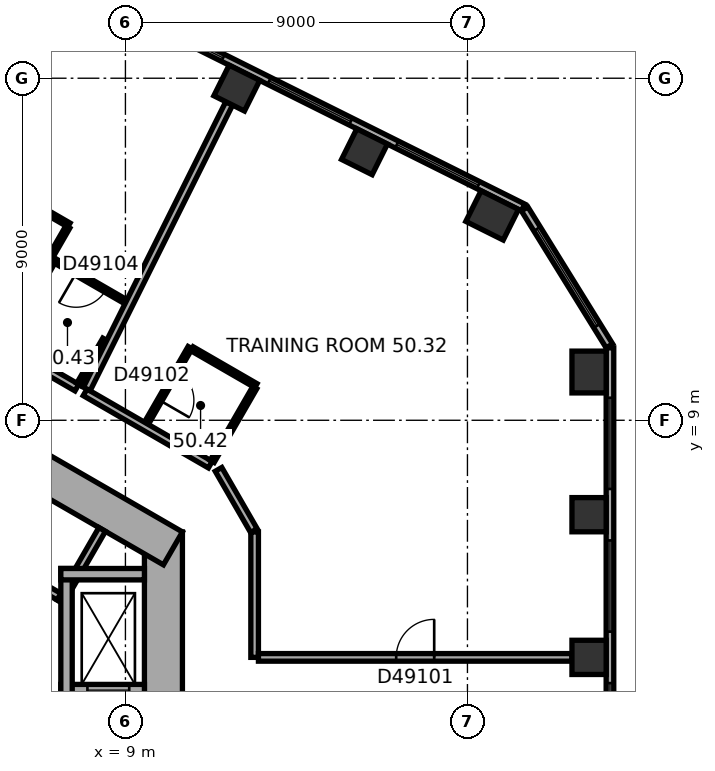
"""IFC4 building model, lengths in metres.
Left out: names, types, materials, properties, quantities, classifications, styles, units other than length and angle.
Written with IfcOpenShell. Run it as: python <this file> out.ifc"""

import sys

from ifc_helpers import new_model, si_unit, direction, frame, frame_2d, origin, origin_2d, place, context, subcontext, project, spatial, rectangle, extrude, element, fill, save


model = new_model("IFC4")
c1 = context("Model", 3, precision=1e-05, world=origin(), true_north=direction((0.0, 1.0)))
c2 = subcontext(c1, "Body", "Model", "MODEL_VIEW")
j1 = project(units=[si_unit("LENGTHUNIT", "METRE"), si_unit("PLANEANGLEUNIT", "RADIAN")], contexts=[c1])
p1 = place(None, origin())
s1 = spatial("IfcSite", under=j1, at=p1, CompositionType="ELEMENT")
p2 = place(p1, origin())
s2 = spatial("IfcBuilding", under=s1, at=p2, CompositionType="ELEMENT")
p3 = place(p2, frame((0.0, 0.0, 202.1)))
s3 = spatial("IfcBuildingStorey", under=s2, at=p3, CompositionType="ELEMENT", Elevation=202.1)
for number, where, z_axis, x_axis in (
    (1, (21.2, 2.761, 0.0), (0.0, 0.0, 1.0), (0.0, 1.0, 0.0)),
    (2, (21.2, 6.515, 0.0), (0.0, 0.0, 1.0), (0.0, 1.0, 0.0)),
):
    element("IfcColumn", number, at=place(p3, frame(where, z_axis=z_axis, x_axis=x_axis)), inside=s3, PredefinedType="COLUMN", context=c2, shape_type="SweptSolid", body=[
        extrude(rectangle(XDim=0.9, YDim=0.9, at=origin_2d()), origin(), (0.0, 0.0, 1.0), 3.7),
    ])
for number, where, z_axis, x_axis in (
    (3, (21.2, 10.27, 0.0), (0.0, 0.0, 1.0), (0.0, 1.0, 0.0)),
    (4, (18.65, 14.39, 0.0), (0.0, 0.0, 1.0), (-0.895, 0.446, 0.0)),
):
    element("IfcColumn", number, at=place(p3, frame(where, z_axis=z_axis, x_axis=x_axis)), inside=s3, PredefinedType="COLUMN", context=c2, shape_type="SweptSolid", body=[
        extrude(rectangle(XDim=1.1, YDim=0.9, at=origin_2d()), origin(), (0.0, 0.0, 1.0), 3.7),
    ])
for number, where, z_axis, x_axis in (
    (5, (15.29, 16.065, 0.0), (0.0, 0.0, 1.0), (-0.895, 0.446, 0.0)),
    (6, (11.931, 17.74, 0.0), (0.0, 0.0, 1.0), (-0.895, 0.446, 0.0)),
):
    element("IfcColumn", number, at=place(p3, frame(where, z_axis=z_axis, x_axis=x_axis)), inside=s3, PredefinedType="COLUMN", context=c2, shape_type="SweptSolid", body=[
        extrude(rectangle(XDim=0.9, YDim=0.9, at=origin_2d()), origin(), (0.0, 0.0, 1.0), 3.7),
    ])
p4 = place(p3, frame((10.0, -6.062, 0.0), z_axis=(0.0, 0.0, 1.0), x_axis=(0.0, 1.0, 0.0)))
e7 = element("IfcWall", 7, at=p4, inside=s3, PredefinedType="SHEAR", context=c2, shape_type="SweptSolid", body=[
    extrude(rectangle(XDim=12.125, YDim=1.0, at=frame_2d((6.062, 0.0))), origin(), (0.0, 0.0, 1.0), 3.7),
])
p5 = place(p4, frame((6.262, 0.0, 0.0)))
e8 = element("IfcOpeningElement", 8, at=p5, cuts=e7, PredefinedType="OPENING", context=c2, shape_type="SweptSolid", body=[
    extrude(rectangle(XDim=1.5, YDim=2.1, at=frame_2d((0.75, 1.05))), frame((0.0, 0.51, 0.0), z_axis=(0.0, -1.0, 0.0), x_axis=(1.0, 0.0, 0.0)), (0.0, 0.0, 1.0), 1.02),
])
p6 = place(p4, frame((1.812, 0.0, 0.0)))
e9 = element("IfcOpeningElement", 9, at=p6, cuts=e7, PredefinedType="OPENING", context=c2, shape_type="SweptSolid", body=[
    extrude(rectangle(XDim=0.9, YDim=2.1, at=frame_2d((0.45, 1.05))), frame((0.0, 0.51, 0.0), z_axis=(0.0, -1.0, 0.0), x_axis=(1.0, 0.0, 0.0)), (0.0, 0.0, 1.0), 1.02),
])
p7 = place(p4, frame((4.412, 0.0, 0.0)))
e10 = element("IfcOpeningElement", 10, at=p7, cuts=e7, PredefinedType="OPENING", context=c2, shape_type="SweptSolid", body=[
    extrude(rectangle(XDim=0.9, YDim=2.1, at=frame_2d((0.45, 1.05))), frame((0.0, 0.51, 0.0), z_axis=(0.0, -1.0, 0.0), x_axis=(1.0, 0.0, 0.0)), (0.0, 0.0, 1.0), 1.02),
])
p8 = place(p3, frame((10.25, 5.629, 0.0), z_axis=(0.0, 0.0, 1.0), x_axis=(-0.866022616891, 0.50000482701, 0.0)))
e11 = element("IfcWall", 11, at=p8, inside=s3, PredefinedType="SHEAR", context=c2, shape_type="SweptSolid", body=[
    extrude(rectangle(XDim=12.125, YDim=1.0, at=frame_2d((6.062, 0.0))), origin(), (0.0, 0.0, 1.0), 3.7),
])
p9 = place(p8, frame((5.312, 0.0, 0.0)))
e12 = element("IfcOpeningElement", 12, at=p9, cuts=e11, PredefinedType="OPENING", context=c2, shape_type="SweptSolid", body=[
    extrude(rectangle(XDim=0.9, YDim=2.1, at=frame_2d((0.45, 1.05))), frame((0.0, 0.51, 0.0), z_axis=(0.0, -1.0, 0.0), x_axis=(1.0, 0.0, 0.0)), (0.0, 0.0, 1.0), 1.02),
])
p10 = place(p3, frame((21.75, -9.138, 0.0), z_axis=(0.0, 0.0, 1.0), x_axis=(0.0, 1.0, 0.0)))
e13 = element("IfcWall", 13, at=p10, inside=s3, PredefinedType="STANDARD", context=c2, shape_type="SweptSolid", body=[
    extrude(rectangle(XDim=20.044, YDim=0.2, at=frame_2d((10.022, 0.0))), origin(), (0.0, 0.0, 1.0), 3.7),
])
p11 = place(p10, frame((1.314, 0.0, 0.9)))
e14 = element("IfcOpeningElement", 14, at=p11, cuts=e13, PredefinedType="OPENING", context=c2, shape_type="SweptSolid", body=[
    extrude(rectangle(XDim=2.4, YDim=2.0, at=frame_2d((1.2, 1.0))), frame((0.0, 0.11, 0.0), z_axis=(0.0, -1.0, 0.0), x_axis=(1.0, 0.0, 0.0)), (0.0, 0.0, 1.0), 0.22),
])
p12 = place(p10, frame((5.069, 0.0, 0.9)))
e15 = element("IfcOpeningElement", 15, at=p12, cuts=e13, PredefinedType="OPENING", context=c2, shape_type="SweptSolid", body=[
    extrude(rectangle(XDim=2.4, YDim=2.0, at=frame_2d((1.2, 1.0))), frame((0.0, 0.11, 0.0), z_axis=(0.0, -1.0, 0.0), x_axis=(1.0, 0.0, 0.0)), (0.0, 0.0, 1.0), 0.22),
])
p13 = place(p10, frame((8.823, 0.0, 0.9)))
e16 = element("IfcOpeningElement", 16, at=p13, cuts=e13, PredefinedType="OPENING", context=c2, shape_type="SweptSolid", body=[
    extrude(rectangle(XDim=2.4, YDim=2.0, at=frame_2d((1.2, 1.0))), frame((0.0, 0.11, 0.0), z_axis=(0.0, -1.0, 0.0), x_axis=(1.0, 0.0, 0.0)), (0.0, 0.0, 1.0), 0.22),
])
p14 = place(p10, frame((12.577, 0.0, 0.9)))
e17 = element("IfcOpeningElement", 17, at=p14, cuts=e13, PredefinedType="OPENING", context=c2, shape_type="SweptSolid", body=[
    extrude(rectangle(XDim=2.4, YDim=2.0, at=frame_2d((1.2, 1.0))), frame((0.0, 0.11, 0.0), z_axis=(0.0, -1.0, 0.0), x_axis=(1.0, 0.0, 0.0)), (0.0, 0.0, 1.0), 0.22),
])
p15 = place(p10, frame((16.331, 0.0, 0.9)))
e18 = element("IfcOpeningElement", 18, at=p15, cuts=e13, PredefinedType="OPENING", context=c2, shape_type="SweptSolid", body=[
    extrude(rectangle(XDim=2.4, YDim=2.0, at=frame_2d((1.2, 1.0))), frame((0.0, 0.11, 0.0), z_axis=(0.0, -1.0, 0.0), x_axis=(1.0, 0.0, 0.0)), (0.0, 0.0, 1.0), 0.22),
])
p16 = place(p3, frame((21.735, 10.958, 0.0), z_axis=(0.0, 0.0, 1.0), x_axis=(-0.526213807775, 0.850352296702, 0.0)))
e19 = element("IfcWall", 19, at=p16, inside=s3, PredefinedType="STANDARD", context=c2, shape_type="SweptSolid", body=[
    extrude(rectangle(XDim=4.238, YDim=0.2, at=frame_2d((2.119, 0.0))), origin(), (0.0, 0.0, 1.0), 3.7),
])
p17 = place(p16, frame((0.619, 0.0, 0.9)))
e20 = element("IfcOpeningElement", 20, at=p17, cuts=e19, PredefinedType="OPENING", context=c2, shape_type="SweptSolid", body=[
    extrude(rectangle(XDim=3.0, YDim=2.0, at=frame_2d((1.5, 1.0))), frame((0.0, 0.11, 0.0), z_axis=(0.0, -1.0, 0.0), x_axis=(1.0, 0.0, 0.0)), (0.0, 0.0, 1.0), 0.22),
])
p18 = place(p3, frame((19.464, 14.599, 0.0), z_axis=(0.0, 0.0, 1.0), x_axis=(-0.894935755043, 0.446195018289, 0.0)))
e21 = element("IfcWall", 21, at=p18, inside=s3, PredefinedType="STANDARD", context=c2, shape_type="SweptSolid", body=[
    extrude(rectangle(XDim=20.044, YDim=0.2, at=frame_2d((10.022, 0.0))), origin(), (0.0, 0.0, 1.0), 3.7),
])
p19 = place(p18, frame((1.313, 0.0, 0.9)))
e22 = element("IfcOpeningElement", 22, at=p19, cuts=e21, PredefinedType="OPENING", context=c2, shape_type="SweptSolid", body=[
    extrude(rectangle(XDim=2.4, YDim=2.0, at=frame_2d((1.2, 1.0))), frame((0.0, 0.11, 0.0), z_axis=(0.0, -1.0, 0.0), x_axis=(1.0, 0.0, 0.0)), (0.0, 0.0, 1.0), 0.22),
])
p20 = place(p18, frame((5.067, 0.0, 0.9)))
e23 = element("IfcOpeningElement", 23, at=p20, cuts=e21, PredefinedType="OPENING", context=c2, shape_type="SweptSolid", body=[
    extrude(rectangle(XDim=2.4, YDim=2.0, at=frame_2d((1.2, 1.0))), frame((0.0, 0.11, 0.0), z_axis=(0.0, -1.0, 0.0), x_axis=(1.0, 0.0, 0.0)), (0.0, 0.0, 1.0), 0.22),
])
p21 = place(p18, frame((8.821, 0.0, 0.9)))
e24 = element("IfcOpeningElement", 24, at=p21, cuts=e21, PredefinedType="OPENING", context=c2, shape_type="SweptSolid", body=[
    extrude(rectangle(XDim=2.4, YDim=2.0, at=frame_2d((1.2, 1.0))), frame((0.0, 0.11, 0.0), z_axis=(0.0, -1.0, 0.0), x_axis=(1.0, 0.0, 0.0)), (0.0, 0.0, 1.0), 0.22),
])
p22 = place(p18, frame((12.575, 0.0, 0.9)))
e25 = element("IfcOpeningElement", 25, at=p22, cuts=e21, PredefinedType="OPENING", context=c2, shape_type="SweptSolid", body=[
    extrude(rectangle(XDim=2.4, YDim=2.0, at=frame_2d((1.2, 1.0))), frame((0.0, 0.11, 0.0), z_axis=(0.0, -1.0, 0.0), x_axis=(1.0, 0.0, 0.0)), (0.0, 0.0, 1.0), 0.22),
])
p23 = place(p18, frame((16.329, 0.0, 0.9)))
e26 = element("IfcOpeningElement", 26, at=p23, cuts=e21, PredefinedType="OPENING", context=c2, shape_type="SweptSolid", body=[
    extrude(rectangle(XDim=2.4, YDim=2.0, at=frame_2d((1.2, 1.0))), frame((0.0, 0.11, 0.0), z_axis=(0.0, -1.0, 0.0), x_axis=(1.0, 0.0, 0.0)), (0.0, 0.0, 1.0), 0.22),
])
p24 = place(p3, frame((7.424, 4.259, 0.0), z_axis=(0.0, 0.0, 1.0), x_axis=(-0.866026010844, 0.49999894854, 0.0)))
e27 = element("IfcWall", 27, at=p24, inside=s3, PredefinedType="PARTITIONING", context=c2, shape_type="SweptSolid", body=[
    extrude(rectangle(XDim=8.0, YDim=0.2, at=frame_2d((4.0, 0.0))), origin(), (0.0, 0.0, 1.0), 3.35),
])
p25 = place(p3, frame((7.287, 4.222, 0.0), z_axis=(0.0, 0.0, 1.0), x_axis=(0.499946605688, 0.86605622881, 0.0)))
e28 = element("IfcWall", 28, at=p25, inside=s3, PredefinedType="PARTITIONING", context=c2, shape_type="SweptSolid", body=[
    extrude(rectangle(XDim=2.2, YDim=0.2, at=frame_2d((1.1, 0.0))), origin(), (0.0, 0.0, 1.0), 3.35),
])
p26 = place(p3, frame((7.3, 1.9, 0.0), z_axis=(0.0, 0.0, 1.0), x_axis=(1.0, 0.0, 0.0)))
e29 = element("IfcWall", 29, at=p26, inside=s3, PredefinedType="SHEAR", context=c2, shape_type="SweptSolid", body=[
    extrude(rectangle(XDim=2.2, YDim=0.3, at=frame_2d((1.1, 0.0))), origin(), (0.0, 0.0, 1.0), 3.35),
])
p27 = place(p26, frame((0.7, 0.0, 0.0)))
e30 = element("IfcOpeningElement", 30, at=p27, cuts=e29, PredefinedType="OPENING", context=c2, shape_type="SweptSolid", body=[
    extrude(rectangle(XDim=1.1, YDim=2.1, at=frame_2d((0.55, 1.05))), frame((0.0, 0.16, 0.0), z_axis=(0.0, -1.0, 0.0), x_axis=(1.0, 0.0, 0.0)), (0.0, 0.0, 1.0), 0.32),
])
p28 = place(p3, frame((7.45, 1.75, 0.0), z_axis=(0.0, 0.0, 1.0), x_axis=(0.0, 1.0, 0.0)))
e31 = element("IfcWall", 31, at=p28, inside=s3, PredefinedType="SHEAR", context=c2, shape_type="SweptSolid", body=[
    extrude(rectangle(XDim=3.35, YDim=0.3, at=frame_2d((1.675, 0.0))), origin(), (0.0, 0.0, 1.0), 3.35),
])
p29 = place(p3, frame((7.3, 4.95, 0.0), z_axis=(0.0, 0.0, 1.0), x_axis=(1.0, 0.0, 0.0)))
e32 = element("IfcWall", 32, at=p29, inside=s3, PredefinedType="SHEAR", context=c2, shape_type="SweptSolid", body=[
    extrude(rectangle(XDim=2.2, YDim=0.3, at=frame_2d((1.1, 0.0))), origin(), (0.0, 0.0, 1.0), 3.35),
])
p30 = place(p3, frame((4.621, 15.807, 0.0), z_axis=(0.0, 0.0, 1.0), x_axis=(0.866039519639, -0.499975549825, 0.0)))
e33 = element("IfcWall", 33, at=p30, inside=s3, PredefinedType="PARTITIONING", context=c2, shape_type="SweptSolid", body=[
    extrude(rectangle(XDim=3.34, YDim=0.12, at=frame_2d((1.67, 0.0))), origin(), (0.0, 0.0, 1.0), 3.35),
])
p31 = place(p3, frame((5.867, 11.046, 0.0), z_axis=(0.0, 0.0, 1.0), x_axis=(0.500004234368, 0.866022959057, 0.0)))
e34 = element("IfcWall", 34, at=p31, inside=s3, PredefinedType="PARTITIONING", context=c2, shape_type="SweptSolid", body=[
    extrude(rectangle(XDim=2.5, YDim=0.12, at=frame_2d((1.25, 0.0))), origin(), (0.0, 0.0, 1.0), 3.35),
])
p32 = place(p3, frame((7.169, 13.181, 0.0), z_axis=(0.0, 0.0, 1.0), x_axis=(0.866048165231, -0.499960573946, 0.0)))
e35 = element("IfcWall", 35, at=p32, inside=s3, PredefinedType="PARTITIONING", context=c2, shape_type="SweptSolid", body=[
    extrude(rectangle(XDim=2.13, YDim=0.12, at=frame_2d((1.065, 0.0))), origin(), (0.0, 0.0, 1.0), 3.35),
])
p33 = place(p32, frame((0.615, 0.0, 0.0)))
e36 = element("IfcOpeningElement", 36, at=p33, cuts=e35, PredefinedType="OPENING", context=c2, shape_type="SweptSolid", body=[
    extrude(rectangle(XDim=0.9, YDim=2.1, at=frame_2d((0.45, 1.05))), frame((0.0, 0.07, 0.0), z_axis=(0.0, -1.0, 0.0), x_axis=(1.0, 0.0, 0.0)), (0.0, 0.0, 1.0), 0.14),
])
p34 = place(p3, frame((7.483, 14.085, 0.0), z_axis=(0.0, 0.0, 1.0), x_axis=(-0.499978425106, -0.866037859697, 0.0)))
e37 = element("IfcWall", 37, at=p34, inside=s3, PredefinedType="PARTITIONING", context=c2, shape_type="SweptSolid", body=[
    extrude(rectangle(XDim=3.44, YDim=0.12, at=frame_2d((1.72, 0.0))), origin(), (0.0, 0.0, 1.0), 3.35),
])
p35 = place(p3, frame((7.722, 9.86, 0.0), z_axis=(0.0, 0.0, 1.0), x_axis=(-0.86598042715, 0.500077893725, 0.0)))
e38 = element("IfcWall", 38, at=p35, inside=s3, PredefinedType="PARTITIONING", context=c2, shape_type="SweptSolid", body=[
    extrude(rectangle(XDim=2.2, YDim=0.2, at=frame_2d((1.1, 0.0))), origin(), (0.0, 0.0, 1.0), 3.35),
])
p36 = place(p3, frame((8.457, 11.132, 0.0), z_axis=(0.0, 0.0, 1.0), x_axis=(-0.500129009956, -0.865950907038, 0.0)))
e39 = element("IfcWall", 39, at=p36, inside=s3, PredefinedType="PARTITIONING", context=c2, shape_type="SweptSolid", body=[
    extrude(rectangle(XDim=1.369, YDim=0.12, at=frame_2d((0.685, 0.0))), origin(), (0.0, 0.0, 1.0), 3.35),
])
p37 = place(p3, frame((9.552, 8.919, 0.0), z_axis=(0.0, 0.0, 1.0), x_axis=(0.499952165731, 0.866053019151, 0.0)))
e40 = element("IfcWall", 40, at=p37, inside=s3, PredefinedType="PARTITIONING", context=c2, shape_type="SweptSolid", body=[
    extrude(rectangle(XDim=2.3, YDim=0.12, at=frame_2d((1.15, 0.0))), origin(), (0.0, 0.0, 1.0), 3.35),
])
p38 = place(p37, frame((0.7, 0.0, 0.0)))
e41 = element("IfcOpeningElement", 41, at=p38, cuts=e40, PredefinedType="OPENING", context=c2, shape_type="SweptSolid", body=[
    extrude(rectangle(XDim=0.9, YDim=2.1, at=frame_2d((0.45, 1.05))), frame((0.0, 0.07, 0.0), z_axis=(0.0, -1.0, 0.0), x_axis=(1.0, 0.0, 0.0)), (0.0, 0.0, 1.0), 0.14),
])
p39 = place(p3, frame((10.753, 10.881, 0.0), z_axis=(0.0, 0.0, 1.0), x_axis=(0.866043088465, -0.499969367985, 0.0)))
e42 = element("IfcWall", 42, at=p39, inside=s3, PredefinedType="PARTITIONING", context=c2, shape_type="SweptSolid", body=[
    extrude(rectangle(XDim=1.94, YDim=0.12, at=frame_2d((0.97, 0.0))), origin(), (0.0, 0.0, 1.0), 3.35),
])
p40 = place(p3, frame((11.233, 7.833, 0.0), z_axis=(0.0, 0.0, 1.0), x_axis=(-0.866002813504, 0.500039125473, 0.0)))
e43 = element("IfcWall", 43, at=p40, inside=s3, PredefinedType="PARTITIONING", context=c2, shape_type="SweptSolid", body=[
    extrude(rectangle(XDim=3.804, YDim=0.2, at=frame_2d((1.902, 0.0))), origin(), (0.0, 0.0, 1.0), 3.35),
])
p41 = place(p3, frame((11.73, 17.338, 0.0), z_axis=(0.0, 0.0, 1.0), x_axis=(-0.446189718314, -0.894938397473, 0.0)))
e44 = element("IfcWall", 44, at=p41, inside=s3, PredefinedType="PARTITIONING", context=c2, shape_type="SweptSolid", body=[
    extrude(rectangle(XDim=8.396, YDim=0.2, at=frame_2d((4.198, 0.0))), origin(), (0.0, 0.0, 1.0), 2.55),
])
p42 = place(p3, frame((12.38, 6.097, 0.0), z_axis=(0.0, 0.0, 1.0), x_axis=(-0.499964847546, 0.866045698112, 0.0)))
e45 = element("IfcWall", 45, at=p42, inside=s3, PredefinedType="PARTITIONING", context=c2, shape_type="SweptSolid", body=[
    extrude(rectangle(XDim=1.86, YDim=0.2, at=frame_2d((0.93, 0.0))), origin(), (0.0, 0.0, 1.0), 3.35),
])
p43 = place(p3, frame((12.4, 2.761, 0.0), z_axis=(0.0, 0.0, 1.0), x_axis=(0.0, 1.0, 0.0)))
e46 = element("IfcWall", 46, at=p43, inside=s3, PredefinedType="PARTITIONING", context=c2, shape_type="SweptSolid", body=[
    extrude(rectangle(XDim=3.301, YDim=0.2, at=frame_2d((1.65, 0.0))), origin(), (0.0, 0.0, 1.0), 3.35),
])
p44 = place(p3, frame((12.404, 9.859, 0.0), z_axis=(0.0, 0.0, 1.0), x_axis=(-0.500030632641, -0.866007717299, 0.0)))
e47 = element("IfcWall", 47, at=p44, inside=s3, PredefinedType="PARTITIONING", context=c2, shape_type="SweptSolid", body=[
    extrude(rectangle(XDim=2.24, YDim=0.12, at=frame_2d((1.12, 0.0))), origin(), (0.0, 0.0, 1.0), 3.35),
])
p45 = place(p3, frame((20.75, 2.761, 0.0), z_axis=(0.0, 0.0, 1.0), x_axis=(-1.0, 0.0, 0.0)))
e48 = element("IfcWall", 48, at=p45, inside=s3, PredefinedType="PARTITIONING", context=c2, shape_type="SweptSolid", body=[
    extrude(rectangle(XDim=8.25, YDim=0.2, at=frame_2d((4.125, 0.0))), origin(), (0.0, 0.0, 1.0), 3.35),
])
p46 = place(p45, frame((3.625, 0.0, 0.0)))
e49 = element("IfcOpeningElement", 49, at=p46, cuts=e48, PredefinedType="OPENING", context=c2, shape_type="SweptSolid", body=[
    extrude(rectangle(XDim=1.0, YDim=2.1, at=frame_2d((0.5, 1.05))), frame((0.0, 0.11, 0.0), z_axis=(0.0, -1.0, 0.0), x_axis=(1.0, 0.0, 0.0)), (0.0, 0.0, 1.0), 0.22),
])
p47 = place(p13, origin())
e50 = element("IfcWindow", 50, at=p47, inside=s3, PartitioningType="SINGLE_PANEL", PredefinedType="WINDOW", context=c2, shape_type="SweptSolid", body=[
    extrude(rectangle(XDim=2.4, YDim=2.0, at=frame_2d((1.2, 1.0))), frame((0.0, 0.03, 0.0), z_axis=(0.0, -1.0, 0.0), x_axis=(1.0, 0.0, 0.0)), (0.0, 0.0, 1.0), 0.06),
])
fill(e16, e50)
p48 = place(p14, origin())
e51 = element("IfcWindow", 51, at=p48, inside=s3, PartitioningType="SINGLE_PANEL", PredefinedType="WINDOW", context=c2, shape_type="SweptSolid", body=[
    extrude(rectangle(XDim=2.4, YDim=2.0, at=frame_2d((1.2, 1.0))), frame((0.0, 0.03, 0.0), z_axis=(0.0, -1.0, 0.0), x_axis=(1.0, 0.0, 0.0)), (0.0, 0.0, 1.0), 0.06),
])
fill(e17, e51)
p49 = place(p15, origin())
e52 = element("IfcWindow", 52, at=p49, inside=s3, PartitioningType="SINGLE_PANEL", PredefinedType="WINDOW", context=c2, shape_type="SweptSolid", body=[
    extrude(rectangle(XDim=2.4, YDim=2.0, at=frame_2d((1.2, 1.0))), frame((0.0, 0.03, 0.0), z_axis=(0.0, -1.0, 0.0), x_axis=(1.0, 0.0, 0.0)), (0.0, 0.0, 1.0), 0.06),
])
fill(e18, e52)
p50 = place(p17, origin())
e53 = element("IfcWindow", 53, at=p50, inside=s3, PartitioningType="SINGLE_PANEL", PredefinedType="WINDOW", context=c2, shape_type="SweptSolid", body=[
    extrude(rectangle(XDim=3.0, YDim=2.0, at=frame_2d((1.5, 1.0))), frame((0.0, 0.03, 0.0), z_axis=(0.0, -1.0, 0.0), x_axis=(1.0, 0.0, 0.0)), (0.0, 0.0, 1.0), 0.06),
])
fill(e20, e53)
p51 = place(p19, origin())
e54 = element("IfcWindow", 54, at=p51, inside=s3, PartitioningType="SINGLE_PANEL", PredefinedType="WINDOW", context=c2, shape_type="SweptSolid", body=[
    extrude(rectangle(XDim=2.4, YDim=2.0, at=frame_2d((1.2, 1.0))), frame((0.0, 0.03, 0.0), z_axis=(0.0, -1.0, 0.0), x_axis=(1.0, 0.0, 0.0)), (0.0, 0.0, 1.0), 0.06),
])
fill(e22, e54)
p52 = place(p20, origin())
e55 = element("IfcWindow", 55, at=p52, inside=s3, PartitioningType="SINGLE_PANEL", PredefinedType="WINDOW", context=c2, shape_type="SweptSolid", body=[
    extrude(rectangle(XDim=2.4, YDim=2.0, at=frame_2d((1.2, 1.0))), frame((0.0, 0.03, 0.0), z_axis=(0.0, -1.0, 0.0), x_axis=(1.0, 0.0, 0.0)), (0.0, 0.0, 1.0), 0.06),
])
fill(e23, e55)
p53 = place(p21, origin())
e56 = element("IfcWindow", 56, at=p53, inside=s3, PartitioningType="SINGLE_PANEL", PredefinedType="WINDOW", context=c2, shape_type="SweptSolid", body=[
    extrude(rectangle(XDim=2.4, YDim=2.0, at=frame_2d((1.2, 1.0))), frame((0.0, 0.03, 0.0), z_axis=(0.0, -1.0, 0.0), x_axis=(1.0, 0.0, 0.0)), (0.0, 0.0, 1.0), 0.06),
])
fill(e24, e56)
p54 = place(p27, origin())
e57 = element("IfcDoor", 57, at=p54, inside=s3, OperationType="DOUBLE_DOOR_SLIDING", PredefinedType="DOOR", context=c2, shape_type="SweptSolid", body=[
    extrude(rectangle(XDim=1.1, YDim=2.1, at=frame_2d((0.55, 1.05))), frame((0.0, 0.025, 0.0), z_axis=(0.0, -1.0, 0.0), x_axis=(1.0, 0.0, 0.0)), (0.0, 0.0, 1.0), 0.05),
])
fill(e30, e57)
p55 = place(p46, origin())
e58 = element("IfcDoor", 58, at=p55, inside=s3, OperationType="SINGLE_SWING_LEFT", PredefinedType="DOOR", context=c2, shape_type="SweptSolid", body=[
    extrude(rectangle(XDim=1.0, YDim=2.1, at=frame_2d((0.5, 1.05))), frame((0.0, 0.025, 0.0), z_axis=(0.0, -1.0, 0.0), x_axis=(1.0, 0.0, 0.0)), (0.0, 0.0, 1.0), 0.05),
])
fill(e49, e58)
p56 = place(p38, origin())
e59 = element("IfcDoor", 59, at=p56, inside=s3, OperationType="SINGLE_SWING_LEFT", PredefinedType="DOOR", context=c2, shape_type="SweptSolid", body=[
    extrude(rectangle(XDim=0.9, YDim=2.1, at=frame_2d((0.45, 1.05))), frame((0.0, 0.025, 0.0), z_axis=(0.0, -1.0, 0.0), x_axis=(1.0, 0.0, 0.0)), (0.0, 0.0, 1.0), 0.05),
])
fill(e41, e59)
p57 = place(p33, origin())
e60 = element("IfcDoor", 60, at=p57, inside=s3, OperationType="SINGLE_SWING_LEFT", PredefinedType="DOOR", context=c2, shape_type="SweptSolid", body=[
    extrude(rectangle(XDim=0.9, YDim=2.1, at=frame_2d((0.45, 1.05))), frame((0.0, 0.025, 0.0), z_axis=(0.0, -1.0, 0.0), x_axis=(1.0, 0.0, 0.0)), (0.0, 0.0, 1.0), 0.05),
])
fill(e36, e60)
save(model, sys.argv[1])
